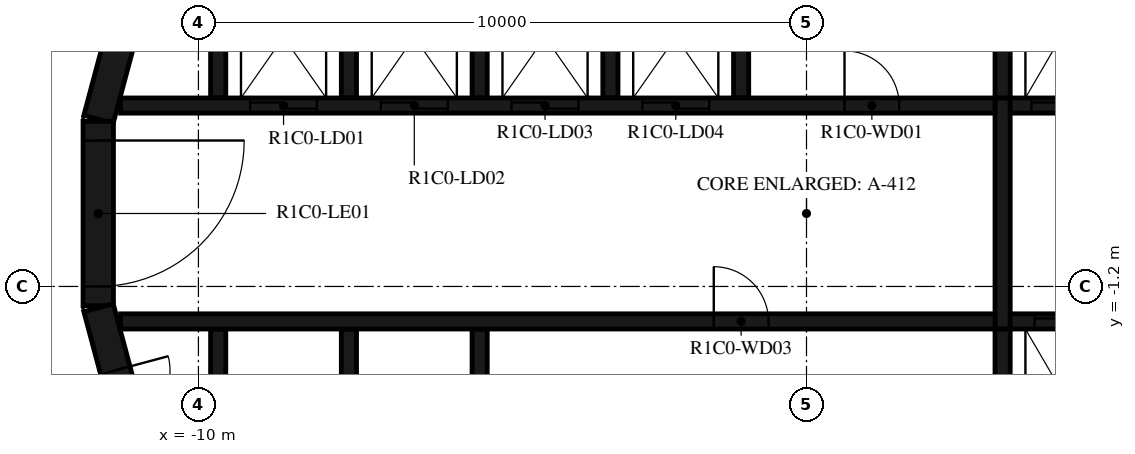
"""IFC4 building model, lengths in metres.
Left out: names, types, materials, properties, quantities, classifications, styles, units other than length and angle.
Written with IfcOpenShell. Run it as: python <this file> out.ifc"""

import sys

from ifc_helpers import new_model, si_unit, direction, frame, frame_2d, origin, place, context, subcontext, project, spatial, polyline, rectangle, outline, extrude, element, fill, save


model = new_model("IFC4")
c1 = context("Model", 3, precision=1e-05, world=origin(), true_north=direction((0.0, 1.0)))
c2 = subcontext(c1, "Body", "Model", "MODEL_VIEW")
j1 = project(units=[si_unit("LENGTHUNIT", "METRE"), si_unit("PLANEANGLEUNIT", "RADIAN")], contexts=[c1])
p1 = place(None, origin())
s1 = spatial("IfcSite", under=j1, at=p1, CompositionType="ELEMENT")
p2 = place(p1, origin())
s2 = spatial("IfcBuilding", under=s1, at=p2, CompositionType="ELEMENT")
p3 = place(p2, frame((0.0, 0.0, 66.4)))
s3 = spatial("IfcBuildingStorey", under=s2, at=p3, CompositionType="ELEMENT", Elevation=66.4)
p4 = place(p3, frame((-10.858, 4.479, 0.0), z_axis=(0.0, 0.0, 1.0), x_axis=(-0.258734743916, -0.965948410781, 0.0)))
e1 = element("IfcWall", 1, at=p4, inside=s3, PredefinedType="SHEAR", context=c2, shape_type="SweptSolid", body=[
    extrude(rectangle(XDim=3.033, YDim=0.5, at=frame_2d((1.516, 0.0))), origin(), (0.0, 0.0, 1.0), 3.05),
])
p5 = place(p3, frame((-11.647, 1.516, 0.0), z_axis=(0.0, 0.0, 1.0), x_axis=(0.0, -1.0, 0.0)))
e2 = element("IfcWall", 2, at=p5, inside=s3, PredefinedType="SHEAR", context=c2, shape_type="SweptSolid", body=[
    extrude(rectangle(XDim=3.033, YDim=0.5, at=frame_2d((1.516, 0.0))), origin(), (0.0, 0.0, 1.0), 3.05),
])
p6 = place(p5, frame((0.316, 0.0, 0.0)))
e3 = element("IfcOpeningElement", 3, at=p6, cuts=e2, PredefinedType="OPENING", context=c2, shape_type="SweptSolid", body=[
    extrude(rectangle(XDim=2.4, YDim=2.1, at=frame_2d((1.2, 1.05))), frame((0.0, 0.26, 0.0), z_axis=(0.0, -1.0, 0.0), x_axis=(1.0, 0.0, 0.0)), (0.0, 0.0, 1.0), 0.52),
])
p7 = place(p3, frame((-11.643, -1.55, 0.0), z_axis=(0.0, 0.0, 1.0), x_axis=(0.258734743916, -0.965948410781, 0.0)))
e4 = element("IfcWall", 4, at=p7, inside=s3, PredefinedType="SHEAR", context=c2, shape_type="SweptSolid", body=[
    extrude(rectangle(XDim=3.033, YDim=0.5, at=frame_2d((1.516, 0.0))), origin(), (0.0, 0.0, 1.0), 3.05),
])
p8 = place(p7, frame((1.066, 0.0, 0.0)))
e5 = element("IfcOpeningElement", 5, at=p8, cuts=e4, PredefinedType="OPENING", context=c2, shape_type="SweptSolid", body=[
    extrude(rectangle(XDim=0.9, YDim=2.1, at=frame_2d((0.45, 1.05))), frame((0.0, 0.26, 0.0), z_axis=(0.0, -1.0, 0.0), x_axis=(1.0, 0.0, 0.0)), (0.0, 0.0, 1.0), 0.52),
])
p9 = place(p3, origin())
e6 = element("IfcWall", 6, at=p9, inside=s3, PredefinedType="SHEAR", context=c2, shape_type="SweptSolid", body=[
    extrude(outline(polyline([(-9.55, 4.8), (-7.65, 4.8), (-7.65, 1.9), (-7.4, 1.9), (-7.4, 4.8), (-5.5, 4.8), (-5.5, 1.9), (-5.25, 1.9), (-5.25, 4.8), (-3.35, 4.8), (-3.35, 1.9), (-3.1, 1.9), (-3.1, 4.8), (-1.2, 4.8), (-1.2, 1.9), (-0.95, 1.9), (-0.95, 4.8), (3.1, 4.8), (3.1, 1.9), (3.35, 1.9), (3.35, 4.8), (5.25, 4.8), (5.25, 1.9), (5.5, 1.9), (5.5, 4.8), (7.4, 4.8), (7.4, 1.9), (7.65, 1.9), (7.65, 4.8), (9.55, 4.8), (9.55, 1.9), (9.8, 1.9), (9.8, 4.8), (9.8, 5.05), (-9.8, 5.05), (-9.8, 4.8), (-9.8, 1.9), (-9.55, 1.9), (-9.55, 4.8)])), origin(), (0.0, 0.0, 1.0), 3.05),
])
p10 = place(p3, origin())
e7 = element("IfcWall", 7, at=p10, inside=s3, PredefinedType="SHEAR", context=c2, shape_type="SweptSolid", body=[
    extrude(outline(polyline([(9.8, -5.05), (9.8, -4.8), (9.8, -1.9), (9.55, -1.9), (9.55, -4.8), (7.65, -4.8), (7.65, -1.9), (7.4, -1.9), (7.4, -4.8), (5.5, -4.8), (5.5, -1.9), (5.25, -1.9), (5.25, -4.8), (3.35, -4.8), (3.35, -1.9), (3.1, -1.9), (3.1, -4.8), (-5.25, -4.8), (-5.25, -1.9), (-5.5, -1.9), (-5.5, -4.8), (-7.4, -4.8), (-7.4, -1.9), (-7.65, -1.9), (-7.65, -4.8), (-9.55, -4.8), (-9.55, -1.9), (-9.8, -1.9), (-9.8, -4.8), (-9.8, -5.05), (9.8, -5.05)])), origin(), (0.0, 0.0, 1.0), 3.05),
])
p11 = place(p3, frame((-11.28, 1.775, 0.0), z_axis=(0.0, 0.0, 1.0), x_axis=(1.0, 0.0, 0.0)))
e8 = element("IfcWall", 8, at=p11, inside=s3, PredefinedType="SHEAR", context=c2, shape_type="SweptSolid", body=[
    extrude(rectangle(XDim=14.38, YDim=0.25, at=frame_2d((7.19, 0.0))), origin(), (0.0, 0.0, 1.0), 3.05),
])
p12 = place(p11, frame((2.13, 0.0, 0.0)))
e9 = element("IfcOpeningElement", 9, at=p12, cuts=e8, PredefinedType="OPENING", context=c2, shape_type="SweptSolid", body=[
    extrude(rectangle(XDim=1.1, YDim=2.1, at=frame_2d((0.55, 1.05))), frame((0.0, 0.135, 0.0), z_axis=(0.0, -1.0, 0.0), x_axis=(1.0, 0.0, 0.0)), (0.0, 0.0, 1.0), 0.27),
])
p13 = place(p11, frame((4.28, 0.0, 0.0)))
e10 = element("IfcOpeningElement", 10, at=p13, cuts=e8, PredefinedType="OPENING", context=c2, shape_type="SweptSolid", body=[
    extrude(rectangle(XDim=1.1, YDim=2.1, at=frame_2d((0.55, 1.05))), frame((0.0, 0.135, 0.0), z_axis=(0.0, -1.0, 0.0), x_axis=(1.0, 0.0, 0.0)), (0.0, 0.0, 1.0), 0.27),
])
p14 = place(p11, frame((6.43, 0.0, 0.0)))
e11 = element("IfcOpeningElement", 11, at=p14, cuts=e8, PredefinedType="OPENING", context=c2, shape_type="SweptSolid", body=[
    extrude(rectangle(XDim=1.1, YDim=2.1, at=frame_2d((0.55, 1.05))), frame((0.0, 0.135, 0.0), z_axis=(0.0, -1.0, 0.0), x_axis=(1.0, 0.0, 0.0)), (0.0, 0.0, 1.0), 0.27),
])
p15 = place(p11, frame((8.58, 0.0, 0.0)))
e12 = element("IfcOpeningElement", 12, at=p15, cuts=e8, PredefinedType="OPENING", context=c2, shape_type="SweptSolid", body=[
    extrude(rectangle(XDim=1.1, YDim=2.1, at=frame_2d((0.55, 1.05))), frame((0.0, 0.135, 0.0), z_axis=(0.0, -1.0, 0.0), x_axis=(1.0, 0.0, 0.0)), (0.0, 0.0, 1.0), 0.27),
])
p16 = place(p11, frame((11.905, 0.0, 0.0)))
e13 = element("IfcOpeningElement", 13, at=p16, cuts=e8, PredefinedType="OPENING", context=c2, shape_type="SweptSolid", body=[
    extrude(rectangle(XDim=0.9, YDim=2.1, at=frame_2d((0.45, 1.05))), frame((0.0, 0.135, 0.0), z_axis=(0.0, -1.0, 0.0), x_axis=(1.0, 0.0, 0.0)), (0.0, 0.0, 1.0), 0.27),
])
p17 = place(p3, frame((3.35, 1.775, 0.0), z_axis=(0.0, 0.0, 1.0), x_axis=(1.0, 0.0, 0.0)))
e14 = element("IfcWall", 14, at=p17, inside=s3, PredefinedType="SHEAR", context=c2, shape_type="SweptSolid", body=[
    extrude(rectangle(XDim=7.93, YDim=0.25, at=frame_2d((3.965, 0.0))), origin(), (0.0, 0.0, 1.0), 3.05),
])
p18 = place(p17, frame((0.35, 0.0, 0.0)))
e15 = element("IfcOpeningElement", 15, at=p18, cuts=e14, PredefinedType="OPENING", context=c2, shape_type="SweptSolid", body=[
    extrude(rectangle(XDim=1.2, YDim=2.4, at=frame_2d((0.6, 1.2))), frame((0.0, 0.135, 0.0), z_axis=(0.0, -1.0, 0.0), x_axis=(1.0, 0.0, 0.0)), (0.0, 0.0, 1.0), 0.27),
])
p19 = place(p17, frame((2.5, 0.0, 0.0)))
e16 = element("IfcOpeningElement", 16, at=p19, cuts=e14, PredefinedType="OPENING", context=c2, shape_type="SweptSolid", body=[
    extrude(rectangle(XDim=1.2, YDim=2.4, at=frame_2d((0.6, 1.2))), frame((0.0, 0.135, 0.0), z_axis=(0.0, -1.0, 0.0), x_axis=(1.0, 0.0, 0.0)), (0.0, 0.0, 1.0), 0.27),
])
p20 = place(p17, frame((4.8, 0.0, 0.0)))
e17 = element("IfcOpeningElement", 17, at=p20, cuts=e14, PredefinedType="OPENING", context=c2, shape_type="SweptSolid", body=[
    extrude(rectangle(XDim=0.9, YDim=2.1, at=frame_2d((0.45, 1.05))), frame((0.0, 0.135, 0.0), z_axis=(0.0, -1.0, 0.0), x_axis=(1.0, 0.0, 0.0)), (0.0, 0.0, 1.0), 0.27),
])
p21 = place(p3, frame((-11.28, -1.775, 0.0), z_axis=(0.0, 0.0, 1.0), x_axis=(1.0, 0.0, 0.0)))
e18 = element("IfcWall", 18, at=p21, inside=s3, PredefinedType="SHEAR", context=c2, shape_type="SweptSolid", body=[
    extrude(rectangle(XDim=14.38, YDim=0.25, at=frame_2d((7.19, 0.0))), origin(), (0.0, 0.0, 1.0), 3.05),
])
p22 = place(p21, frame((9.755, 0.0, 0.0)))
e19 = element("IfcOpeningElement", 19, at=p22, cuts=e18, PredefinedType="OPENING", context=c2, shape_type="SweptSolid", body=[
    extrude(rectangle(XDim=0.9, YDim=2.1, at=frame_2d((0.45, 1.05))), frame((0.0, 0.135, 0.0), z_axis=(0.0, -1.0, 0.0), x_axis=(1.0, 0.0, 0.0)), (0.0, 0.0, 1.0), 0.27),
])
p23 = place(p3, frame((3.35, -1.775, 0.0), z_axis=(0.0, 0.0, 1.0), x_axis=(1.0, 0.0, 0.0)))
e20 = element("IfcWall", 20, at=p23, inside=s3, PredefinedType="SHEAR", context=c2, shape_type="SweptSolid", body=[
    extrude(rectangle(XDim=7.93, YDim=0.25, at=frame_2d((3.965, 0.0))), origin(), (0.0, 0.0, 1.0), 3.05),
])
p24 = place(p23, frame((0.4, 0.0, 0.0)))
e21 = element("IfcOpeningElement", 21, at=p24, cuts=e20, PredefinedType="OPENING", context=c2, shape_type="SweptSolid", body=[
    extrude(rectangle(XDim=1.1, YDim=2.4, at=frame_2d((0.55, 1.2))), frame((0.0, 0.135, 0.0), z_axis=(0.0, -1.0, 0.0), x_axis=(1.0, 0.0, 0.0)), (0.0, 0.0, 1.0), 0.27),
])
p25 = place(p23, frame((2.55, 0.0, 0.0)))
e22 = element("IfcOpeningElement", 22, at=p25, cuts=e20, PredefinedType="OPENING", context=c2, shape_type="SweptSolid", body=[
    extrude(rectangle(XDim=1.1, YDim=2.4, at=frame_2d((0.55, 1.2))), frame((0.0, 0.135, 0.0), z_axis=(0.0, -1.0, 0.0), x_axis=(1.0, 0.0, 0.0)), (0.0, 0.0, 1.0), 0.27),
])
p26 = place(p23, frame((4.7, 0.0, 0.0)))
e23 = element("IfcOpeningElement", 23, at=p26, cuts=e20, PredefinedType="OPENING", context=c2, shape_type="SweptSolid", body=[
    extrude(rectangle(XDim=1.1, YDim=2.4, at=frame_2d((0.55, 1.2))), frame((0.0, 0.135, 0.0), z_axis=(0.0, -1.0, 0.0), x_axis=(1.0, 0.0, 0.0)), (0.0, 0.0, 1.0), 0.27),
])
p27 = place(p3, frame((3.225, -1.9, 0.0), z_axis=(0.0, 0.0, 1.0), x_axis=(0.0, 1.0, 0.0)))
e24 = element("IfcWall", 24, at=p27, inside=s3, PredefinedType="SHEAR", context=c2, shape_type="SweptSolid", body=[
    extrude(rectangle(XDim=3.8, YDim=0.25, at=frame_2d((1.9, 0.0))), origin(), (0.0, 0.0, 1.0), 3.05),
])
p28 = place(p6, origin())
e25 = element("IfcDoor", 25, at=p28, inside=s3, OperationType="DOUBLE_DOOR_SINGLE_SWING", PredefinedType="DOOR", context=c2, shape_type="SweptSolid", body=[
    extrude(rectangle(XDim=2.4, YDim=2.1, at=frame_2d((1.2, 1.05))), frame((0.0, 0.025, 0.0), z_axis=(0.0, -1.0, 0.0), x_axis=(1.0, 0.0, 0.0)), (0.0, 0.0, 1.0), 0.05),
])
fill(e3, e25)
p29 = place(p12, origin())
e26 = element("IfcDoor", 26, at=p29, inside=s3, OperationType="DOUBLE_DOOR_SLIDING", PredefinedType="DOOR", context=c2, shape_type="SweptSolid", body=[
    extrude(rectangle(XDim=1.1, YDim=2.1, at=frame_2d((0.55, 1.05))), frame((0.0, 0.025, 0.0), z_axis=(0.0, -1.0, 0.0), x_axis=(1.0, 0.0, 0.0)), (0.0, 0.0, 1.0), 0.05),
])
fill(e9, e26)
p30 = place(p13, origin())
e27 = element("IfcDoor", 27, at=p30, inside=s3, OperationType="DOUBLE_DOOR_SLIDING", PredefinedType="DOOR", context=c2, shape_type="SweptSolid", body=[
    extrude(rectangle(XDim=1.1, YDim=2.1, at=frame_2d((0.55, 1.05))), frame((0.0, 0.025, 0.0), z_axis=(0.0, -1.0, 0.0), x_axis=(1.0, 0.0, 0.0)), (0.0, 0.0, 1.0), 0.05),
])
fill(e10, e27)
p31 = place(p14, origin())
e28 = element("IfcDoor", 28, at=p31, inside=s3, OperationType="DOUBLE_DOOR_SLIDING", PredefinedType="DOOR", context=c2, shape_type="SweptSolid", body=[
    extrude(rectangle(XDim=1.1, YDim=2.1, at=frame_2d((0.55, 1.05))), frame((0.0, 0.025, 0.0), z_axis=(0.0, -1.0, 0.0), x_axis=(1.0, 0.0, 0.0)), (0.0, 0.0, 1.0), 0.05),
])
fill(e11, e28)
p32 = place(p15, origin())
e29 = element("IfcDoor", 29, at=p32, inside=s3, OperationType="DOUBLE_DOOR_SLIDING", PredefinedType="DOOR", context=c2, shape_type="SweptSolid", body=[
    extrude(rectangle(XDim=1.1, YDim=2.1, at=frame_2d((0.55, 1.05))), frame((0.0, 0.025, 0.0), z_axis=(0.0, -1.0, 0.0), x_axis=(1.0, 0.0, 0.0)), (0.0, 0.0, 1.0), 0.05),
])
fill(e12, e29)
p33 = place(p18, origin())
e30 = element("IfcDoor", 30, at=p33, inside=s3, OperationType="DOUBLE_DOOR_SLIDING", PredefinedType="DOOR", context=c2, shape_type="SweptSolid", body=[
    extrude(rectangle(XDim=1.2, YDim=2.4, at=frame_2d((0.6, 1.2))), frame((0.0, 0.025, 0.0), z_axis=(0.0, -1.0, 0.0), x_axis=(1.0, 0.0, 0.0)), (0.0, 0.0, 1.0), 0.05),
])
fill(e15, e30)
p34 = place(p24, origin())
e31 = element("IfcDoor", 31, at=p34, inside=s3, OperationType="DOUBLE_DOOR_SLIDING", PredefinedType="DOOR", context=c2, shape_type="SweptSolid", body=[
    extrude(rectangle(XDim=1.1, YDim=2.4, at=frame_2d((0.55, 1.2))), frame((0.0, 0.025, 0.0), z_axis=(0.0, -1.0, 0.0), x_axis=(1.0, 0.0, 0.0)), (0.0, 0.0, 1.0), 0.05),
])
fill(e21, e31)
p35 = place(p16, origin())
e32 = element("IfcDoor", 32, at=p35, inside=s3, OperationType="SINGLE_SWING_RIGHT", PredefinedType="DOOR", context=c2, shape_type="SweptSolid", body=[
    extrude(rectangle(XDim=0.9, YDim=2.1, at=frame_2d((0.45, 1.05))), frame((0.0, 0.025, 0.0), z_axis=(0.0, -1.0, 0.0), x_axis=(1.0, 0.0, 0.0)), (0.0, 0.0, 1.0), 0.05),
])
fill(e13, e32)
p36 = place(p22, origin())
e33 = element("IfcDoor", 33, at=p36, inside=s3, OperationType="SINGLE_SWING_RIGHT", PredefinedType="DOOR", context=c2, shape_type="SweptSolid", body=[
    extrude(rectangle(XDim=0.9, YDim=2.1, at=frame_2d((0.45, 1.05))), frame((0.0, 0.025, 0.0), z_axis=(0.0, -1.0, 0.0), x_axis=(1.0, 0.0, 0.0)), (0.0, 0.0, 1.0), 0.05),
])
fill(e19, e33)
p37 = place(p8, origin())
e34 = element("IfcDoor", 34, at=p37, inside=s3, OperationType="SINGLE_SWING_LEFT", PredefinedType="DOOR", context=c2, shape_type="SweptSolid", body=[
    extrude(rectangle(XDim=0.9, YDim=2.1, at=frame_2d((0.45, 1.05))), frame((0.0, 0.025, 0.0), z_axis=(0.0, -1.0, 0.0), x_axis=(1.0, 0.0, 0.0)), (0.0, 0.0, 1.0), 0.05),
])
fill(e5, e34)
save(model, sys.argv[1])
